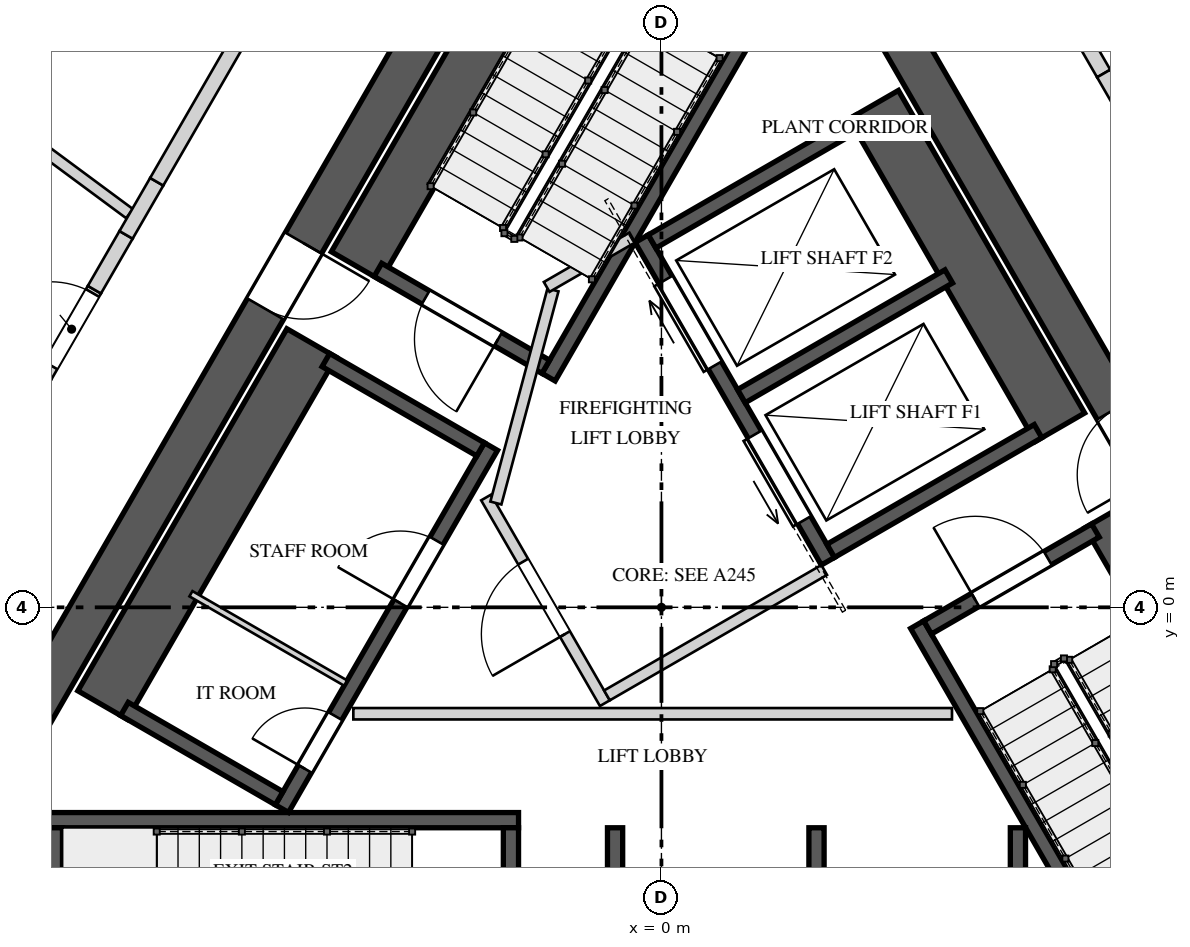
"""IFC4 building model, lengths in metres.
Left out: names, types, materials, properties, quantities, classifications, styles, units other than length and angle.
Written with IfcOpenShell. Run it as: python <this file> out.ifc"""

import sys

from ifc_helpers import new_model, si_unit, direction, frame, frame_2d, origin, place, context, subcontext, project, spatial, polyline, rectangle, outline, extrude, element, fill, save


model = new_model("IFC4")
c1 = context("Model", 3, precision=1e-05, world=origin(), true_north=direction((0.0, 1.0)))
c2 = subcontext(c1, "Body", "Model", "MODEL_VIEW")
j1 = project(units=[si_unit("LENGTHUNIT", "METRE"), si_unit("PLANEANGLEUNIT", "RADIAN")], contexts=[c1])
p1 = place(None, origin())
s1 = spatial("IfcSite", under=j1, at=p1, CompositionType="ELEMENT")
p2 = place(p1, origin())
s2 = spatial("IfcBuilding", under=s1, at=p2, CompositionType="ELEMENT")
p3 = place(p2, frame((0.0, 0.0, 352.4)))
s3 = spatial("IfcBuildingStorey", under=s2, at=p3, CompositionType="ELEMENT", Elevation=352.4)
p4 = place(p3, frame((-1.285, 10.725, 0.0), z_axis=(0.0, 0.0, 1.0), x_axis=(-0.499994590896, -0.86602852671, 0.0)))
e1 = element("IfcWall", 1, at=p4, inside=s3, PredefinedType="SHEAR", context=c2, shape_type="SweptSolid", body=[
    extrude(rectangle(XDim=17.292, YDim=0.55, at=frame_2d((8.646, 0.0))), origin(), (0.0, 0.0, 1.0), 4.5),
])
p5 = place(p4, frame((6.851, 0.0, 0.0)))
e2 = element("IfcOpeningElement", 2, at=p5, cuts=e1, PredefinedType="OPENING", context=c2, shape_type="SweptSolid", body=[
    extrude(rectangle(XDim=1.0, YDim=2.4, at=frame_2d((0.5, 1.2))), frame((0.0, 0.285, 0.0), z_axis=(0.0, -1.0, 0.0), x_axis=(1.0, 0.0, 0.0)), (0.0, 0.0, 1.0), 0.57),
])
p6 = place(p3, frame((9.93, -4.25, 0.0), z_axis=(0.0, 0.0, 1.0), x_axis=(-0.499994590896, 0.86602852671, 0.0)))
e3 = element("IfcWall", 3, at=p6, inside=s3, PredefinedType="SHEAR", context=c2, shape_type="SweptSolid", body=[
    extrude(rectangle(XDim=17.292, YDim=0.55, at=frame_2d((8.646, 0.0))), origin(), (0.0, 0.0, 1.0), 4.5),
])
p7 = place(p6, frame((6.921, 0.0, 0.0)))
e4 = element("IfcOpeningElement", 4, at=p7, cuts=e3, PredefinedType="OPENING", context=c2, shape_type="SweptSolid", body=[
    extrude(rectangle(XDim=1.0, YDim=2.4, at=frame_2d((0.5, 1.2))), frame((0.0, 0.285, 0.0), z_axis=(0.0, -1.0, 0.0), x_axis=(1.0, 0.0, 0.0)), (0.0, 0.0, 1.0), 0.57),
])
p8 = place(p6, frame((14.626, 0.0, 0.0)))
e5 = element("IfcOpeningElement", 5, at=p8, cuts=e3, PredefinedType="OPENING", context=c2, shape_type="SweptSolid", body=[
    extrude(rectangle(XDim=0.8, YDim=2.1, at=frame_2d((0.4, 1.05))), frame((0.0, 0.285, 0.0), z_axis=(0.0, -1.0, 0.0), x_axis=(1.0, 0.0, 0.0)), (0.0, 0.0, 1.0), 0.57),
])
p9 = place(p3, frame((-0.918, 9.86, 0.0), z_axis=(0.0, 0.0, 1.0), x_axis=(-0.500026960575, -0.86600983753, 0.0)))
e6 = element("IfcWall", 6, at=p9, inside=s3, PredefinedType="SOLIDWALL", context=c2, shape_type="SweptSolid", body=[
    extrude(rectangle(XDim=6.2, YDim=0.75, at=frame_2d((3.1, 0.0))), origin(), (0.0, 0.0, 1.0), 4.15),
])
p10 = place(p3, frame((1.615, 8.397, 0.0), z_axis=(0.0, 0.0, 1.0), x_axis=(-0.500009909098, -0.866019682689, 0.0)))
e7 = element("IfcWall", 7, at=p10, inside=s3, PredefinedType="SOLIDWALL", context=c2, shape_type="SweptSolid", body=[
    extrude(rectangle(XDim=6.2, YDim=0.2, at=frame_2d((3.1, 0.0))), origin(), (0.0, 0.0, 1.0), 4.15),
])
p11 = place(p3, frame((-1.521, 3.165, 0.0), z_axis=(0.0, 0.0, 1.0), x_axis=(-0.866030925526, 0.499990435942, 0.0)))
e8 = element("IfcWall", 8, at=p11, inside=s3, PredefinedType="SOLIDWALL", context=c2, shape_type="SweptSolid", body=[
    extrude(rectangle(XDim=2.55, YDim=0.2, at=frame_2d((1.275, 0.0))), origin(), (0.0, 0.0, 1.0), 4.15),
])
p12 = place(p11, frame((0.725, 0.0, 0.0)))
e9 = element("IfcOpeningElement", 9, at=p12, cuts=e8, PredefinedType="OPENING", context=c2, shape_type="SweptSolid", body=[
    extrude(rectangle(XDim=1.1, YDim=2.4, at=frame_2d((0.55, 1.2))), frame((0.0, 0.11, 0.0), z_axis=(0.0, -1.0, 0.0), x_axis=(1.0, 0.0, 0.0)), (0.0, 0.0, 1.0), 0.22),
])
p13 = place(p3, frame((-8.08, -2.8, 0.0), z_axis=(0.0, 0.0, 1.0), x_axis=(1.0, 0.0, 0.0)))
e10 = element("IfcWall", 10, at=p13, inside=s3, PredefinedType="SOLIDWALL", context=c2, shape_type="SweptSolid", body=[
    extrude(rectangle(XDim=6.2, YDim=0.2, at=frame_2d((3.1, 0.0))), origin(), (0.0, 0.0, 1.0), 4.15),
])
p14 = place(p3, frame((-7.98, -2.9, 0.0), z_axis=(0.0, 0.0, 1.0), x_axis=(0.0, -1.0, 0.0)))
e11 = element("IfcWall", 11, at=p14, inside=s3, PredefinedType="SOLIDWALL", context=c2, shape_type="SweptSolid", body=[
    extrude(rectangle(XDim=2.55, YDim=0.2, at=frame_2d((1.275, 0.0))), origin(), (0.0, 0.0, 1.0), 4.15),
])
p15 = place(p3, frame((-1.98, -2.9, 0.0), z_axis=(0.0, 0.0, 1.0), x_axis=(0.0, -1.0, 0.0)))
e12 = element("IfcWall", 12, at=p15, inside=s3, PredefinedType="SOLIDWALL", context=c2, shape_type="SweptSolid", body=[
    extrude(rectangle(XDim=2.55, YDim=0.2, at=frame_2d((1.275, 0.0))), origin(), (0.0, 0.0, 1.0), 4.15),
])
p16 = place(p15, frame((0.725, 0.0, 0.0)))
e13 = element("IfcOpeningElement", 13, at=p16, cuts=e12, PredefinedType="OPENING", context=c2, shape_type="SweptSolid", body=[
    extrude(rectangle(XDim=1.1, YDim=2.4, at=frame_2d((0.55, 1.2))), frame((0.0, 0.11, 0.0), z_axis=(0.0, -1.0, 0.0), x_axis=(1.0, 0.0, 0.0)), (0.0, 0.0, 1.0), 0.22),
])
p17 = place(p3, frame((8.998, -4.135, 0.0), z_axis=(0.0, 0.0, 1.0), x_axis=(-0.500009909098, 0.866019682689, 0.0)))
e14 = element("IfcWall", 14, at=p17, inside=s3, PredefinedType="SOLIDWALL", context=c2, shape_type="SweptSolid", body=[
    extrude(rectangle(XDim=6.2, YDim=0.75, at=frame_2d((3.1, 0.0))), origin(), (0.0, 0.0, 1.0), 4.15),
])
p18 = place(p3, frame((6.465, -5.597, 0.0), z_axis=(0.0, 0.0, 1.0), x_axis=(-0.49998037582, 0.866036733513, 0.0)))
e15 = element("IfcWall", 15, at=p18, inside=s3, PredefinedType="SOLIDWALL", context=c2, shape_type="SweptSolid", body=[
    extrude(rectangle(XDim=6.2, YDim=0.2, at=frame_2d((3.1, 0.0))), origin(), (0.0, 0.0, 1.0), 4.15),
])
p19 = place(p3, frame((3.501, -0.265, 0.0), z_axis=(0.0, 0.0, 1.0), x_axis=(0.866030925526, 0.499990435942, 0.0)))
e16 = element("IfcWall", 16, at=p19, inside=s3, PredefinedType="SOLIDWALL", context=c2, shape_type="SweptSolid", body=[
    extrude(rectangle(XDim=2.55, YDim=0.2, at=frame_2d((1.275, 0.0))), origin(), (0.0, 0.0, 1.0), 4.15),
])
p20 = place(p19, frame((0.725, 0.0, 0.0)))
e17 = element("IfcOpeningElement", 17, at=p20, cuts=e16, PredefinedType="OPENING", context=c2, shape_type="SweptSolid", body=[
    extrude(rectangle(XDim=1.1, YDim=2.4, at=frame_2d((0.55, 1.2))), frame((0.0, 0.11, 0.0), z_axis=(0.0, -1.0, 0.0), x_axis=(1.0, 0.0, 0.0)), (0.0, 0.0, 1.0), 0.22),
])
p21 = place(p3, frame((-4.993, -2.648, 0.0), z_axis=(0.0, 0.0, 1.0), x_axis=(0.499996545922, 0.866027397988, 0.0)))
e18 = element("IfcWall", 18, at=p21, inside=s3, PredefinedType="SOLIDWALL", context=c2, shape_type="SweptSolid", body=[
    extrude(rectangle(XDim=5.5, YDim=0.2, at=frame_2d((2.75, 0.0))), origin(), (0.0, 0.0, 1.0), 4.15),
])
p22 = place(p21, frame((3.12, 0.0, 0.0)))
e19 = element("IfcOpeningElement", 19, at=p22, cuts=e18, PredefinedType="OPENING", context=c2, shape_type="SweptSolid", body=[
    extrude(rectangle(XDim=0.95, YDim=2.4, at=frame_2d((0.475, 1.2))), frame((0.0, 0.11, 0.0), z_axis=(0.0, -1.0, 0.0), x_axis=(1.0, 0.0, 0.0)), (0.0, 0.0, 1.0), 0.22),
])
p23 = place(p21, frame((0.605, 0.0, 0.0)))
e20 = element("IfcOpeningElement", 20, at=p23, cuts=e18, PredefinedType="OPENING", context=c2, shape_type="SweptSolid", body=[
    extrude(rectangle(XDim=0.8, YDim=2.1, at=frame_2d((0.4, 1.05))), frame((0.0, 0.11, 0.0), z_axis=(0.0, -1.0, 0.0), x_axis=(1.0, 0.0, 0.0)), (0.0, 0.0, 1.0), 0.22),
])
p24 = place(p3, frame((-4.603, 3.477, 0.0), z_axis=(0.0, 0.0, 1.0), x_axis=(-0.500015767406, -0.866016300277, 0.0)))
e21 = element("IfcWall", 21, at=p24, inside=s3, PredefinedType="SOLIDWALL", context=c2, shape_type="SweptSolid", body=[
    extrude(rectangle(XDim=5.5, YDim=0.75, at=frame_2d((2.75, 0.0))), origin(), (0.0, 0.0, 1.0), 4.15),
])
p25 = place(p3, frame((-2.38, 2.078, 0.0), z_axis=(0.0, 0.0, 1.0), x_axis=(-0.866061024631, 0.499938297808, 0.0)))
e22 = element("IfcWall", 22, at=p25, inside=s3, PredefinedType="SOLIDWALL", context=c2, shape_type="SweptSolid", body=[
    extrude(rectangle(XDim=2.35, YDim=0.2, at=frame_2d((1.175, 0.0))), origin(), (0.0, 0.0, 1.0), 4.15),
])
p26 = place(p3, frame((-5.03, -2.512, 0.0), z_axis=(0.0, 0.0, 1.0), x_axis=(-0.866016039709, 0.500016218704, 0.0)))
e23 = element("IfcWall", 23, at=p26, inside=s3, PredefinedType="SOLIDWALL", context=c2, shape_type="SweptSolid", body=[
    extrude(rectangle(XDim=2.35, YDim=0.2, at=frame_2d((1.175, 0.0))), origin(), (0.0, 0.0, 1.0), 4.15),
])
p27 = place(p3, frame((-4.155, -0.996, 0.0), z_axis=(0.0, 0.0, 1.0), x_axis=(-0.866016039709, 0.500016218704, 0.0)))
e24 = element("IfcWall", 24, at=p27, inside=s3, PredefinedType="PARTITIONING", context=c2, shape_type="SweptSolid", body=[
    extrude(rectangle(XDim=2.35, YDim=0.08, at=frame_2d((1.175, 0.0))), origin(), (0.0, 0.0, 1.0), 4.15),
])
for number, where, z_axis, x_axis in (
    (25, (-0.61, -2.9, 0.0), (0.0, 0.0, 1.0), (0.0, -1.0, 0.0)),
    (26, (2.04, -2.9, 0.0), (0.0, 0.0, 1.0), (0.0, -1.0, 0.0)),
    (27, (4.69, -2.9, 0.0), (0.0, 0.0, 1.0), (0.0, -1.0, 0.0)),
):
    element("IfcWall", number, at=place(p3, frame(where, z_axis=z_axis, x_axis=x_axis)), inside=s3, PredefinedType="SOLIDWALL", context=c2, shape_type="SweptSolid", body=[
        extrude(rectangle(XDim=0.8, YDim=0.2, at=frame_2d((0.4, 0.0))), origin(), (0.0, 0.0, 1.0), 4.15),
    ])
p28 = place(p3, frame((2.19, 0.606, 0.0), z_axis=(0.0, 0.0, 1.0), x_axis=(-0.500002801628, 0.866023786258, 0.0)))
e28 = element("IfcWall", 28, at=p28, inside=s3, PredefinedType="SOLIDWALL", context=c2, shape_type="SweptSolid", body=[
    extrude(rectangle(XDim=4.9, YDim=0.2, at=frame_2d((2.45, 0.0))), origin(), (0.0, 0.0, 1.0), 4.15),
])
p29 = place(p28, frame((0.625, 0.0, 0.0)))
e29 = element("IfcOpeningElement", 29, at=p29, cuts=e28, PredefinedType="OPENING", context=c2, shape_type="SweptSolid", body=[
    extrude(rectangle(XDim=1.3, YDim=2.1, at=frame_2d((0.65, 1.05))), frame((0.0, 0.11, 0.0), z_axis=(0.0, -1.0, 0.0), x_axis=(1.0, 0.0, 0.0)), (0.0, 0.0, 1.0), 0.22),
])
p30 = place(p28, frame((2.975, 0.0, 0.0)))
e30 = element("IfcOpeningElement", 30, at=p30, cuts=e28, PredefinedType="OPENING", context=c2, shape_type="SweptSolid", body=[
    extrude(rectangle(XDim=1.3, YDim=2.1, at=frame_2d((0.65, 1.05))), frame((0.0, 0.11, 0.0), z_axis=(0.0, -1.0, 0.0), x_axis=(1.0, 0.0, 0.0)), (0.0, 0.0, 1.0), 0.22),
])
p31 = place(p3, frame((5.243, 2.369, 0.0), z_axis=(0.0, 0.0, 1.0), x_axis=(-0.500002801628, 0.866023786258, 0.0)))
e31 = element("IfcWall", 31, at=p31, inside=s3, PredefinedType="SOLIDWALL", context=c2, shape_type="SweptSolid", body=[
    extrude(rectangle(XDim=4.9, YDim=0.75, at=frame_2d((2.45, 0.0))), origin(), (0.0, 0.0, 1.0), 4.15),
])
for number, where, z_axis, x_axis in (
    (32, (2.227, 0.743, 0.0), (0.0, 0.0, 1.0), (0.866, 0.5, 0.0)),
    (33, (1.052, 2.778, 0.0), (0.0, 0.0, 1.0), (0.866, 0.5, 0.0)),
    (34, (-0.123, 4.813, 0.0), (0.0, 0.0, 1.0), (0.866, 0.5, 0.0)),
):
    element("IfcWall", number, at=place(p3, frame(where, z_axis=z_axis, x_axis=x_axis)), inside=s3, PredefinedType="SOLIDWALL", context=c2, shape_type="SweptSolid", body=[
        extrude(rectangle(XDim=3.15, YDim=0.2, at=frame_2d((1.575, 0.0))), origin(), (0.0, 0.0, 1.0), 4.15),
    ])
p32 = place(p3, frame((-0.744, -1.261, 0.0), z_axis=(0.0, 0.0, 1.0), x_axis=(-0.500004234368, 0.866022959057, 0.0)))
e35 = element("IfcWall", 35, at=p32, inside=s3, PredefinedType="PARTITIONING", context=c2, shape_type="SweptSolid", body=[
    extrude(rectangle(XDim=3.125, YDim=0.15, at=frame_2d((1.562, 0.0))), origin(), (0.0, 0.0, 1.0), 4.15),
])
p33 = place(p32, frame((1.05, 0.0, 0.0)))
e36 = element("IfcOpeningElement", 36, at=p33, cuts=e35, PredefinedType="OPENING", context=c2, shape_type="SweptSolid", body=[
    extrude(rectangle(XDim=1.1, YDim=2.4, at=frame_2d((0.55, 1.2))), frame((0.0, 0.085, 0.0), z_axis=(0.0, -1.0, 0.0), x_axis=(1.0, 0.0, 0.0)), (0.0, 0.0, 1.0), 0.17),
])
p34 = place(p3, frame((-0.717, -1.159, 0.0), z_axis=(0.0, 0.0, 1.0), x_axis=(0.866008176907, 0.50002983664, 0.0)))
e37 = element("IfcWall", 37, at=p34, inside=s3, PredefinedType="PARTITIONING", context=c2, shape_type="SweptSolid", body=[
    extrude(rectangle(XDim=3.3, YDim=0.15, at=frame_2d((1.65, 0.0))), origin(), (0.0, 0.0, 1.0), 4.15),
])
p35 = place(p3, frame((-2.178, 1.372, 0.0), z_axis=(0.0, 0.0, 1.0), x_axis=(0.258808958833, 0.96592852884, 0.0)))
e38 = element("IfcWall", 38, at=p35, inside=s3, PredefinedType="PARTITIONING", context=c2, shape_type="SweptSolid", body=[
    extrude(rectangle(XDim=2.903, YDim=0.15, at=frame_2d((1.451, 0.0))), origin(), (0.0, 0.0, 1.0), 4.15),
])
p36 = place(p3, frame((-1.51, 4.215, 0.0), z_axis=(0.0, 0.0, 1.0), x_axis=(0.866085525409, 0.49989585183, 0.0)))
e39 = element("IfcWall", 39, at=p36, inside=s3, PredefinedType="PARTITIONING", context=c2, shape_type="SweptSolid", body=[
    extrude(rectangle(XDim=1.3, YDim=0.15, at=frame_2d((0.65, 0.0))), origin(), (0.0, 0.0, 1.0), 4.15),
])
p37 = place(p3, frame((-4.053, -1.4, 0.0), z_axis=(0.0, 0.0, 1.0), x_axis=(1.0, 0.0, 0.0)))
e40 = element("IfcWall", 40, at=p37, inside=s3, PredefinedType="PARTITIONING", context=c2, shape_type="SweptSolid", body=[
    extrude(rectangle(XDim=7.876, YDim=0.15, at=frame_2d((3.938, 0.0))), origin(), (0.0, 0.0, 1.0), 4.15),
])
p38 = place(p3, frame((-6.998, 5.18, 0.0), z_axis=(0.0, 0.0, 1.0), x_axis=(-0.803760198744, 0.594953395582, 0.0)))
e41 = element("IfcWall", 41, at=p38, inside=s3, PredefinedType="PARTITIONING", context=c2, shape_type="SweptSolid", body=[
    extrude(rectangle(XDim=10.117, YDim=0.15, at=frame_2d((5.059, 0.0))), origin(), (0.0, 0.0, 1.0), 3.25),
])
p39 = place(p3, frame((-8.116, 3.043, 0.0), z_axis=(0.0, 0.0, 1.0), x_axis=(0.500023253097, 0.866011978186, 0.0)))
e42 = element("IfcWall", 42, at=p39, inside=s3, PredefinedType="SOLIDWALL", context=c2, shape_type="SweptSolid", body=[
    extrude(outline(polyline([(0.0, 0.0), (1.312, 0.0), (1.311, 4.15), (0.906, 4.15), (0.906, 3.05), (0.0, 3.05), (0.0, 0.0)])), frame((0.0, 0.1, 0.0), z_axis=(0.0, -1.0, 0.0), x_axis=(1.0, 0.0, 0.0)), (0.0, 0.0, 1.0), 0.2),
])
p40 = place(p39, frame((0.161, 0.0, 0.0)))
e43 = element("IfcOpeningElement", 43, at=p40, cuts=e42, PredefinedType="OPENING", context=c2, shape_type="SweptSolid", body=[
    extrude(rectangle(XDim=1.1, YDim=2.4, at=frame_2d((0.55, 1.2))), frame((0.0, 0.11, 0.0), z_axis=(0.0, -1.0, 0.0), x_axis=(1.0, 0.0, 0.0)), (0.0, 0.0, 1.0), 0.22),
])
p41 = place(p3, frame((-7.46, 4.179, 0.0), z_axis=(0.0, 0.0, 1.0), x_axis=(0.499891655525, 0.866087947461, 0.0)))
e44 = element("IfcWall", 44, at=p41, inside=s3, PredefinedType="SOLIDWALL", context=c2, shape_type="SweptSolid", body=[
    extrude(rectangle(XDim=0.833, YDim=0.2, at=frame_2d((0.417, 0.0))), origin(), (0.0, 0.0, 1.0), 4.15),
])
p42 = place(p3, frame((-7.044, 4.9, 0.0), z_axis=(0.0, 0.0, 1.0), x_axis=(0.500141487433, 0.865943700565, 0.0)))
e45 = element("IfcWall", 45, at=p42, inside=s3, PredefinedType="SOLIDWALL", context=c2, shape_type="SweptSolid", body=[
    extrude(rectangle(XDim=0.807, YDim=0.2, at=frame_2d((0.403, 0.0))), origin(), (0.0, 0.0, 1.0), 3.25),
])
p43 = place(p3, frame((-6.64, 5.599, 0.0), z_axis=(0.0, 0.0, 1.0), x_axis=(0.499999662836, 0.866025598446, 0.0)))
e46 = element("IfcWall", 46, at=p43, inside=s3, PredefinedType="SOLIDWALL", context=c2, shape_type="SweptSolid", body=[
    extrude(rectangle(XDim=2.312, YDim=0.2, at=frame_2d((1.156, 0.0))), origin(), (0.0, 0.0, 1.0), 4.15),
])
p44 = place(p3, frame((4.99, 8.457, 0.0), z_axis=(0.0, 0.0, 1.0), x_axis=(0.500024536802, -0.866011236992, 0.0)))
e47 = element("IfcWall", 47, at=p44, inside=s3, PredefinedType="SOLIDWALL", context=c2, shape_type="SweptSolid", body=[
    extrude(rectangle(XDim=1.656, YDim=0.2, at=frame_2d((0.828, 0.0))), origin(), (0.0, 0.0, 1.0), 4.15),
])
p45 = place(p3, frame((5.818, 7.023, 0.0), z_axis=(0.0, 0.0, 1.0), x_axis=(0.500006071987, -0.866021898093, 0.0)))
e48 = element("IfcWall", 48, at=p45, inside=s3, PredefinedType="SOLIDWALL", context=c2, shape_type="SweptSolid", body=[
    extrude(rectangle(XDim=0.944, YDim=0.2, at=frame_2d((0.472, 0.0))), origin(), (0.0, 0.0, 1.0), 3.05),
])
p46 = place(p12, origin())
e49 = element("IfcDoor", 49, at=p46, inside=s3, OperationType="SINGLE_SWING_RIGHT", PredefinedType="DOOR", context=c2, shape_type="SweptSolid", body=[
    extrude(rectangle(XDim=1.1, YDim=2.4, at=frame_2d((0.55, 1.2))), frame((0.0, 0.025, 0.0), z_axis=(0.0, -1.0, 0.0), x_axis=(1.0, 0.0, 0.0)), (0.0, 0.0, 1.0), 0.05),
])
fill(e9, e49)
p47 = place(p20, origin())
e50 = element("IfcDoor", 50, at=p47, inside=s3, OperationType="SINGLE_SWING_RIGHT", PredefinedType="DOOR", context=c2, shape_type="SweptSolid", body=[
    extrude(rectangle(XDim=1.1, YDim=2.4, at=frame_2d((0.55, 1.2))), frame((0.0, 0.025, 0.0), z_axis=(0.0, -1.0, 0.0), x_axis=(1.0, 0.0, 0.0)), (0.0, 0.0, 1.0), 0.05),
])
fill(e17, e50)
p48 = place(p22, origin())
e51 = element("IfcDoor", 51, at=p48, inside=s3, OperationType="SINGLE_SWING_LEFT", PredefinedType="DOOR", context=c2, shape_type="SweptSolid", body=[
    extrude(rectangle(XDim=0.95, YDim=2.4, at=frame_2d((0.475, 1.2))), frame((0.0, 0.025, 0.0), z_axis=(0.0, -1.0, 0.0), x_axis=(1.0, 0.0, 0.0)), (0.0, 0.0, 1.0), 0.05),
])
fill(e19, e51)
p49 = place(p23, origin())
e52 = element("IfcDoor", 52, at=p49, inside=s3, OperationType="SINGLE_SWING_RIGHT", PredefinedType="DOOR", context=c2, shape_type="SweptSolid", body=[
    extrude(rectangle(XDim=0.8, YDim=2.1, at=frame_2d((0.4, 1.05))), frame((0.0, 0.025, 0.0), z_axis=(0.0, -1.0, 0.0), x_axis=(1.0, 0.0, 0.0)), (0.0, 0.0, 1.0), 0.05),
])
fill(e20, e52)
p50 = place(p29, origin())
e53 = element("IfcDoor", 53, at=p50, inside=s3, OperationType="SLIDING_TO_LEFT", PredefinedType="DOOR", context=c2, shape_type="SweptSolid", body=[
    extrude(rectangle(XDim=1.3, YDim=2.1, at=frame_2d((0.65, 1.05))), frame((0.0, 0.025, 0.0), z_axis=(0.0, -1.0, 0.0), x_axis=(1.0, 0.0, 0.0)), (0.0, 0.0, 1.0), 0.05),
])
fill(e29, e53)
p51 = place(p30, origin())
e54 = element("IfcDoor", 54, at=p51, inside=s3, OperationType="SLIDING_TO_RIGHT", PredefinedType="DOOR", context=c2, shape_type="SweptSolid", body=[
    extrude(rectangle(XDim=1.3, YDim=2.1, at=frame_2d((0.65, 1.05))), frame((0.0, 0.025, 0.0), z_axis=(0.0, -1.0, 0.0), x_axis=(1.0, 0.0, 0.0)), (0.0, 0.0, 1.0), 0.05),
])
fill(e30, e54)
p52 = place(p33, origin())
e55 = element("IfcDoor", 55, at=p52, inside=s3, OperationType="SINGLE_SWING_LEFT", PredefinedType="DOOR", context=c2, shape_type="SweptSolid", body=[
    extrude(rectangle(XDim=1.1, YDim=2.4, at=frame_2d((0.55, 1.2))), frame((0.0, 0.025, 0.0), z_axis=(0.0, -1.0, 0.0), x_axis=(1.0, 0.0, 0.0)), (0.0, 0.0, 1.0), 0.05),
])
fill(e36, e55)
p53 = place(p5, origin())
e56 = element("IfcDoor", 56, at=p53, inside=s3, OperationType="SINGLE_SWING_RIGHT", PredefinedType="DOOR", context=c2, shape_type="SweptSolid", body=[
    extrude(rectangle(XDim=1.0, YDim=2.4, at=frame_2d((0.5, 1.2))), frame((0.0, 0.025, 0.0), z_axis=(0.0, -1.0, 0.0), x_axis=(1.0, 0.0, 0.0)), (0.0, 0.0, 1.0), 0.05),
])
fill(e2, e56)
p54 = place(p40, origin())
e57 = element("IfcDoor", 57, at=p54, inside=s3, OperationType="SINGLE_SWING_RIGHT", PredefinedType="DOOR", context=c2, shape_type="SweptSolid", body=[
    extrude(rectangle(XDim=1.1, YDim=2.4, at=frame_2d((0.55, 1.2))), frame((0.0, 0.025, 0.0), z_axis=(0.0, -1.0, 0.0), x_axis=(1.0, 0.0, 0.0)), (0.0, 0.0, 1.0), 0.05),
])
fill(e43, e57)
save(model, sys.argv[1])
